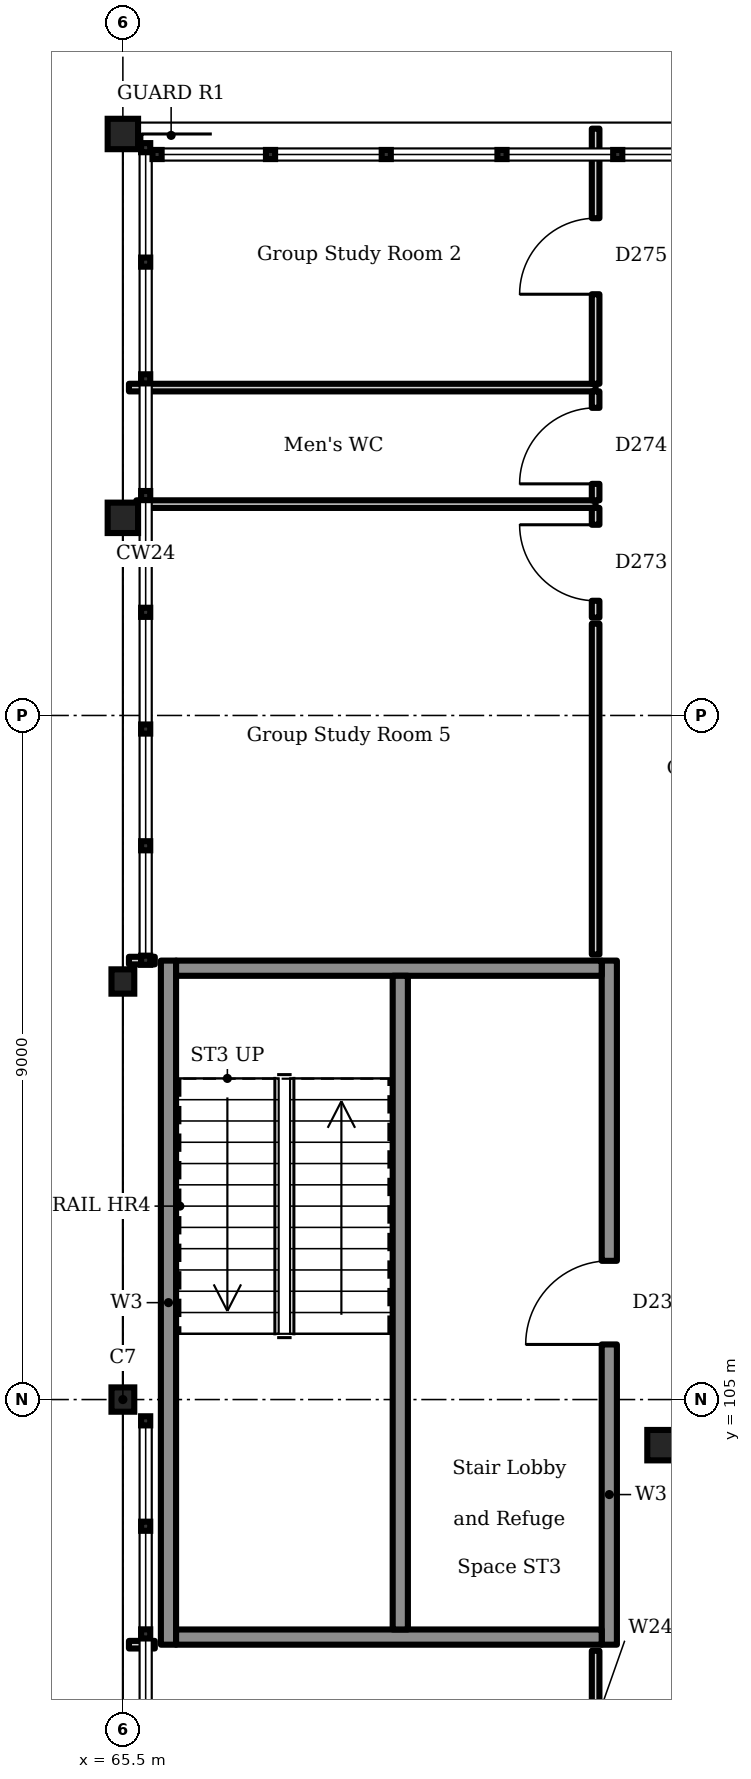
"""IFC4 building model, lengths in metres.
Left out: names, types, materials, properties, quantities, classifications, styles, units other than length and angle.
Written with IfcOpenShell. Run it as: python <this file> out.ifc"""

import sys

from ifc_helpers import new_model, si_unit, direction, frame, frame_2d, origin, origin_2d, place, context, subcontext, project, spatial, rectangle, hollow_circle, i_section, extrude, element, fill, save


model = new_model("IFC4")
c1 = context("Model", 3, precision=1e-05, world=origin(), true_north=direction((0.0, 1.0)))
c2 = subcontext(c1, "Body", "Model", "MODEL_VIEW")
j1 = project(units=[si_unit("LENGTHUNIT", "METRE"), si_unit("PLANEANGLEUNIT", "RADIAN")], contexts=[c1])
p1 = place(None, origin())
s1 = spatial("IfcSite", under=j1, at=p1, CompositionType="ELEMENT")
p2 = place(p1, origin())
s2 = spatial("IfcBuilding", under=s1, at=p2, CompositionType="ELEMENT")
p3 = place(p2, frame((0.0, 0.0, 14.4)))
s3 = spatial("IfcBuildingStorey", under=s2, at=p3, CompositionType="ELEMENT", Elevation=14.4)
for number, where, z_axis, x_axis in (
    (1, (65.5, 105.0, 0.0), (0.0, 0.0, 1.0), (1.0, 0.0, 0.0)),
    (2, (65.5, 110.5, 0.0), (0.0, 0.0, 1.0), (1.0, 0.0, 0.0)),
):
    element("IfcColumn", number, at=place(p3, frame(where, z_axis=z_axis, x_axis=x_axis)), inside=s3, PredefinedType="COLUMN", context=c2, shape_type="SweptSolid", body=[
        extrude(i_section(OverallWidth=0.3, OverallDepth=0.32, WebThickness=0.011, FlangeThickness=0.021, FilletRadius=0.027, at=origin_2d()), origin(), (0.0, 0.0, 1.0), 4.5),
    ])
p4 = place(p3, frame((72.6, 104.4, 0.0), z_axis=(0.0, 0.0, 1.0), x_axis=(1.0, 0.0, 0.0)))
e3 = element("IfcColumn", 3, at=p4, inside=s3, PredefinedType="COLUMN", context=c2, shape_type="SweptSolid", body=[
    extrude(hollow_circle(Radius=0.203, WallThickness=0.016, at=origin_2d()), origin(), (0.0, 0.0, 1.0), 4.5),
])
for number, where, z_axis, x_axis in (
    (4, (65.5, 121.65, 0.0), (0.0, 0.0, 1.0), (1.0, 0.0, 0.0)),
    (5, (65.5, 116.6, 0.0), (0.0, 0.0, 1.0), (1.0, 0.0, 0.0)),
):
    element("IfcColumn", number, at=place(p3, frame(where, z_axis=z_axis, x_axis=x_axis)), inside=s3, PredefinedType="COLUMN", context=c2, shape_type="SweptSolid", body=[
        extrude(hollow_circle(Radius=0.178, WallThickness=0.008, at=origin_2d()), origin(), (0.0, 0.0, 1.0), 4.5),
    ])
p5 = place(p3, frame((66.1, 101.775, 0.0), z_axis=(0.0, 0.0, 1.0), x_axis=(0.0, 1.0, 0.0)))
e6 = element("IfcWall", 6, at=p5, inside=s3, PredefinedType="SOLIDWALL", context=c2, shape_type="SweptSolid", body=[
    extrude(rectangle(XDim=9.0, YDim=0.2, at=frame_2d((4.5, 0.0))), origin(), (0.0, 0.0, 1.0), 4.35),
])
p6 = place(p3, frame((71.9, 101.775, 0.0), z_axis=(0.0, 0.0, 1.0), x_axis=(0.0, 1.0, 0.0)))
e7 = element("IfcWall", 7, at=p6, inside=s3, PredefinedType="SOLIDWALL", context=c2, shape_type="SweptSolid", body=[
    extrude(rectangle(XDim=9.0, YDim=0.2, at=frame_2d((4.5, 0.0))), origin(), (0.0, 0.0, 1.0), 4.35),
])
p7 = place(p6, frame((3.95, 0.0, 0.0)))
e8 = element("IfcOpeningElement", 8, at=p7, cuts=e7, PredefinedType="OPENING", context=c2, shape_type="SweptSolid", body=[
    extrude(rectangle(XDim=1.1, YDim=2.1, at=frame_2d((0.55, 1.05))), frame((0.0, 0.11, 0.0), z_axis=(0.0, -1.0, 0.0), x_axis=(1.0, 0.0, 0.0)), (0.0, 0.0, 1.0), 0.22),
])
for number, where, z_axis, x_axis in (
    (9, (66.2, 101.875, 0.0), (0.0, 0.0, 1.0), (1.0, 0.0, 0.0)),
    (10, (66.2, 110.675, 0.0), (0.0, 0.0, 1.0), (1.0, 0.0, 0.0)),
):
    element("IfcWall", number, at=place(p3, frame(where, z_axis=z_axis, x_axis=x_axis)), inside=s3, PredefinedType="SOLIDWALL", context=c2, shape_type="SweptSolid", body=[
        extrude(rectangle(XDim=5.6, YDim=0.2, at=frame_2d((2.8, 0.0))), origin(), (0.0, 0.0, 1.0), 4.35),
    ])
p8 = place(p3, frame((69.15, 101.975, 0.0), z_axis=(0.0, 0.0, 1.0), x_axis=(0.0, 1.0, 0.0)))
e11 = element("IfcWall", 11, at=p8, inside=s3, PredefinedType="SOLIDWALL", context=c2, shape_type="SweptSolid", body=[
    extrude(rectangle(XDim=8.6, YDim=0.2, at=frame_2d((4.3, 0.0))), origin(), (0.0, 0.0, 1.0), 4.35),
])
p9 = place(p3, frame((65.58, 101.775, 0.0), z_axis=(0.0, 0.0, 1.0), x_axis=(1.0, 0.0, 0.0)))
e12 = element("IfcWall", 12, at=p9, inside=s3, PredefinedType="PARTITIONING", context=c2, shape_type="SweptSolid", body=[
    extrude(rectangle(XDim=0.34, YDim=0.1, at=frame_2d((0.17, 0.0))), origin(), (0.0, 0.0, 1.0), 3.91),
])
p10 = place(p3, frame((71.72, 101.695, 0.0), z_axis=(0.0, 0.0, 1.0), x_axis=(0.0, -1.0, 0.0)))
e13 = element("IfcWall", 13, at=p10, inside=s3, PredefinedType="PARTITIONING", context=c2, shape_type="SweptSolid", body=[
    extrude(rectangle(XDim=5.615, YDim=0.1, at=frame_2d((2.808, 0.0))), origin(), (0.0, 0.0, 1.0), 4.35),
])
p11 = place(p10, frame((1.907, 0.0, 0.0)))
e14 = element("IfcOpeningElement", 14, at=p11, cuts=e13, PredefinedType="OPENING", context=c2, shape_type="SweptSolid", body=[
    extrude(rectangle(XDim=1.8, YDim=2.1, at=frame_2d((0.9, 1.05))), frame((0.0, 0.06, 0.0), z_axis=(0.0, -1.0, 0.0), x_axis=(1.0, 0.0, 0.0)), (0.0, 0.0, 1.0), 0.12),
])
p12 = place(p3, frame((65.678, 116.781, 0.0), z_axis=(0.0, 0.0, 1.0), x_axis=(1.0, 0.0, 0.0)))
e15 = element("IfcWall", 15, at=p12, inside=s3, PredefinedType="PARTITIONING", context=c2, shape_type="SweptSolid", body=[
    extrude(rectangle(XDim=6.042, YDim=0.1, at=frame_2d((3.021, 0.0))), origin(), (0.0, 0.0, 1.0), 3.85),
])
p13 = place(p3, frame((71.72, 116.73, 0.0), z_axis=(0.0, 0.0, 1.0), x_axis=(0.0, -1.0, 0.0)))
e16 = element("IfcWall", 16, at=p13, inside=s3, PredefinedType="PARTITIONING", context=c2, shape_type="SweptSolid", body=[
    extrude(rectangle(XDim=1.443, YDim=0.1, at=frame_2d((0.722, 0.0))), origin(), (0.0, 0.0, 1.0), 4.35),
])
p14 = place(p13, frame((0.222, 0.0, 0.0)))
e17 = element("IfcOpeningElement", 17, at=p14, cuts=e16, PredefinedType="OPENING", context=c2, shape_type="SweptSolid", body=[
    extrude(rectangle(XDim=1.0, YDim=2.1, at=frame_2d((0.5, 1.05))), frame((0.0, 0.06, 0.0), z_axis=(0.0, -1.0, 0.0), x_axis=(1.0, 0.0, 0.0)), (0.0, 0.0, 1.0), 0.12),
])
p15 = place(p3, frame((71.72, 115.207, 0.0), z_axis=(0.0, 0.0, 1.0), x_axis=(0.0, -1.0, 0.0)))
e18 = element("IfcWall", 18, at=p15, inside=s3, PredefinedType="PARTITIONING", context=c2, shape_type="SweptSolid", body=[
    extrude(rectangle(XDim=4.352, YDim=0.1, at=frame_2d((2.176, 0.0))), origin(), (0.0, 0.0, 1.0), 4.35),
])
p16 = place(p3, frame((65.92, 110.775, 0.0), z_axis=(0.0, 0.0, 1.0), x_axis=(-1.0, 0.0, 0.0)))
e19 = element("IfcWall", 19, at=p16, inside=s3, PredefinedType="PARTITIONING", context=c2, shape_type="SweptSolid", body=[
    extrude(rectangle(XDim=0.34, YDim=0.1, at=frame_2d((0.17, 0.0))), origin(), (0.0, 0.0, 1.0), 4.04),
])
p17 = place(p3, frame((65.58, 118.314, 0.0), z_axis=(0.0, 0.0, 1.0), x_axis=(1.0, 0.0, 0.0)))
e20 = element("IfcWall", 20, at=p17, inside=s3, PredefinedType="PARTITIONING", context=c2, shape_type="SweptSolid", body=[
    extrude(rectangle(XDim=6.14, YDim=0.1, at=frame_2d((3.07, 0.0))), origin(), (0.0, 0.0, 1.0), 3.85),
])
p18 = place(p3, frame((71.72, 118.264, 0.0), z_axis=(0.0, 0.0, 1.0), x_axis=(0.0, -1.0, 0.0)))
e21 = element("IfcWall", 21, at=p18, inside=s3, PredefinedType="PARTITIONING", context=c2, shape_type="SweptSolid", body=[
    extrude(rectangle(XDim=1.433, YDim=0.1, at=frame_2d((0.717, 0.0))), origin(), (0.0, 0.0, 1.0), 4.35),
])
p19 = place(p18, frame((0.217, 0.0, 0.0)))
e22 = element("IfcOpeningElement", 22, at=p19, cuts=e21, PredefinedType="OPENING", context=c2, shape_type="SweptSolid", body=[
    extrude(rectangle(XDim=1.0, YDim=2.1, at=frame_2d((0.5, 1.05))), frame((0.0, 0.06, 0.0), z_axis=(0.0, -1.0, 0.0), x_axis=(1.0, 0.0, 0.0)), (0.0, 0.0, 1.0), 0.12),
])
p20 = place(p3, frame((71.72, 121.72, 0.0), z_axis=(0.0, 0.0, 1.0), x_axis=(0.0, -1.0, 0.0)))
e23 = element("IfcWall", 23, at=p20, inside=s3, PredefinedType="PARTITIONING", context=c2, shape_type="SweptSolid", body=[
    extrude(rectangle(XDim=3.356, YDim=0.1, at=frame_2d((1.678, 0.0))), origin(), (0.0, 0.0, 1.0), 3.95),
])
p21 = place(p20, frame((1.178, 0.0, 0.0)))
e24 = element("IfcOpeningElement", 24, at=p21, cuts=e23, PredefinedType="OPENING", context=c2, shape_type="SweptSolid", body=[
    extrude(rectangle(XDim=1.0, YDim=2.1, at=frame_2d((0.5, 1.05))), frame((0.0, 0.06, 0.0), z_axis=(0.0, -1.0, 0.0), x_axis=(1.0, 0.0, 0.0)), (0.0, 0.0, 1.0), 0.12),
])
p22 = place(p7, origin())
e25 = element("IfcDoor", 25, at=p22, inside=s3, OperationType="SINGLE_SWING_RIGHT", PredefinedType="DOOR", context=c2, shape_type="SweptSolid", body=[
    extrude(rectangle(XDim=1.1, YDim=2.1, at=frame_2d((0.55, 1.05))), frame((0.0, 0.025, 0.0), z_axis=(0.0, -1.0, 0.0), x_axis=(1.0, 0.0, 0.0)), (0.0, 0.0, 1.0), 0.05),
])
fill(e8, e25)
p23 = place(p14, frame((1.0, 0.0, 0.0), z_axis=(0.0, 0.0, 1.0), x_axis=(-1.0, 0.0, 0.0)))
e26 = element("IfcDoor", 26, at=p23, inside=s3, OperationType="SINGLE_SWING_LEFT", PredefinedType="DOOR", context=c2, shape_type="SweptSolid", body=[
    extrude(rectangle(XDim=1.0, YDim=2.1, at=frame_2d((0.5, 1.05))), frame((0.0, 0.025, 0.0), z_axis=(0.0, -1.0, 0.0), x_axis=(1.0, 0.0, 0.0)), (0.0, 0.0, 1.0), 0.05),
])
fill(e17, e26)
p24 = place(p19, frame((1.0, 0.0, 0.0), z_axis=(0.0, 0.0, 1.0), x_axis=(-1.0, 0.0, 0.0)))
e27 = element("IfcDoor", 27, at=p24, inside=s3, OperationType="SINGLE_SWING_RIGHT", PredefinedType="DOOR", context=c2, shape_type="SweptSolid", body=[
    extrude(rectangle(XDim=1.0, YDim=2.1, at=frame_2d((0.5, 1.05))), frame((0.0, 0.025, 0.0), z_axis=(0.0, -1.0, 0.0), x_axis=(1.0, 0.0, 0.0)), (0.0, 0.0, 1.0), 0.05),
])
fill(e22, e27)
p25 = place(p21, frame((1.0, 0.0, 0.0), z_axis=(0.0, 0.0, 1.0), x_axis=(-1.0, 0.0, 0.0)))
e28 = element("IfcDoor", 28, at=p25, inside=s3, OperationType="SINGLE_SWING_RIGHT", PredefinedType="DOOR", context=c2, shape_type="SweptSolid", body=[
    extrude(rectangle(XDim=1.0, YDim=2.1, at=frame_2d((0.5, 1.05))), frame((0.0, 0.025, 0.0), z_axis=(0.0, -1.0, 0.0), x_axis=(1.0, 0.0, 0.0)), (0.0, 0.0, 1.0), 0.05),
])
fill(e24, e28)
save(model, sys.argv[1])
